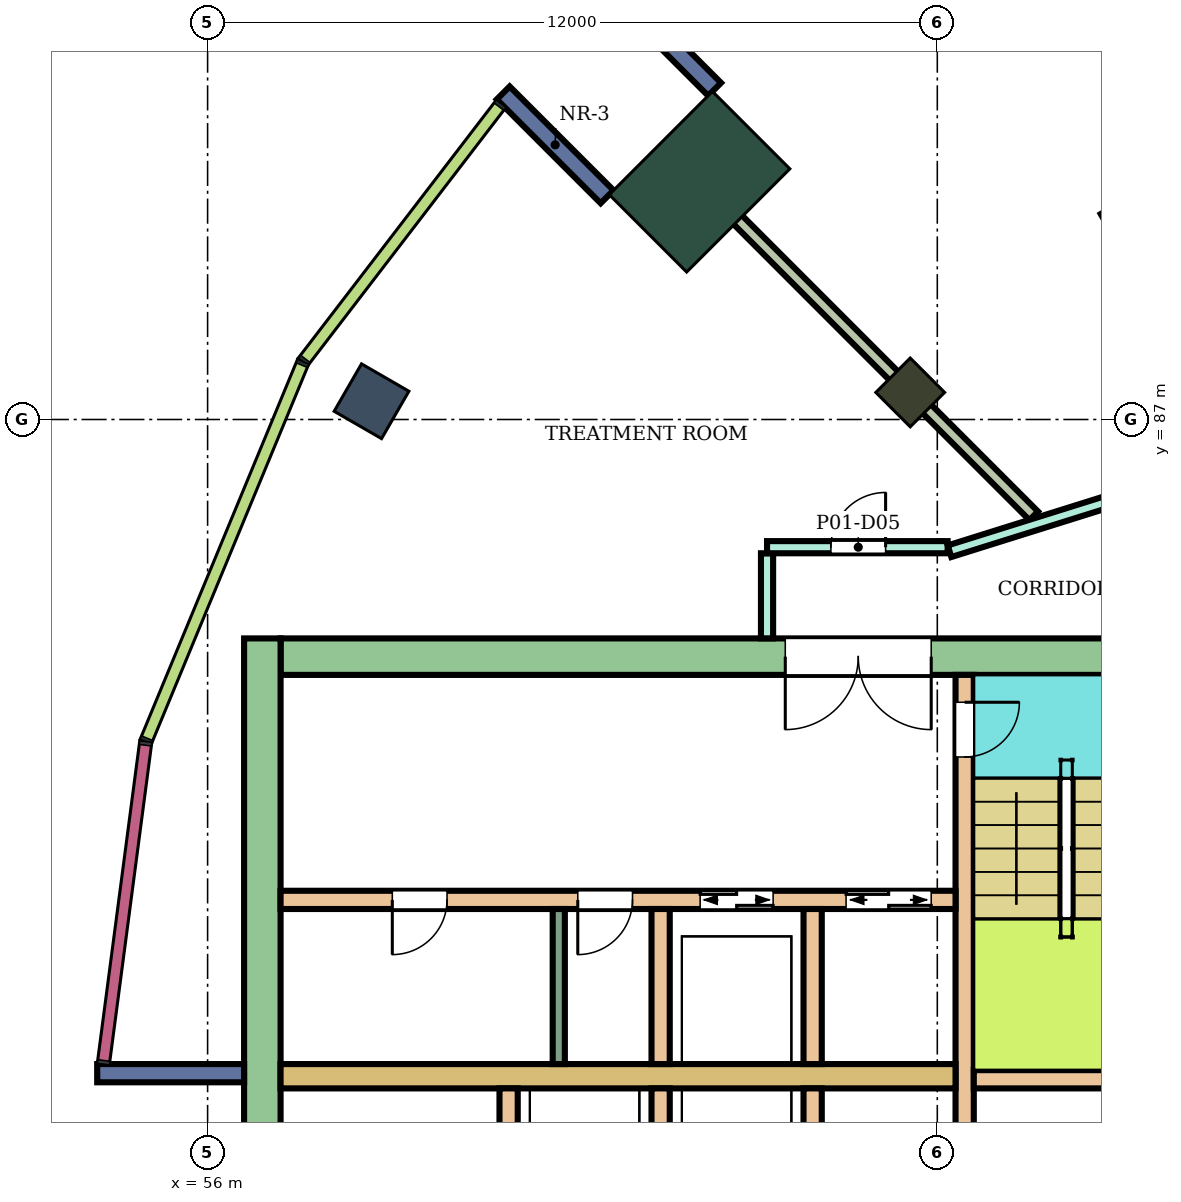
"""IFC4 building model, lengths in metres.
Left out: names, types, materials, properties, quantities, classifications, styles, units other than length and angle.
Written with IfcOpenShell. Run it as: python <this file> out.ifc"""

import sys

from ifc_helpers import new_model, si_unit, direction, frame, frame_2d, origin, origin_2d, place, context, subcontext, project, spatial, rectangle, extrude, element, fill, save


model = new_model("IFC4")
c1 = context("Model", 3, precision=1e-05, world=origin(), true_north=direction((0.0, 1.0)))
c2 = subcontext(c1, "Body", "Model", "MODEL_VIEW")
j1 = project(units=[si_unit("LENGTHUNIT", "METRE"), si_unit("PLANEANGLEUNIT", "RADIAN")], contexts=[c1])
p1 = place(None, origin())
s1 = spatial("IfcSite", under=j1, at=p1, CompositionType="ELEMENT")
p2 = place(p1, origin())
s2 = spatial("IfcBuilding", under=s1, at=p2, CompositionType="ELEMENT")
p3 = place(p2, frame((0.0, 0.0, 270.9)))
s3 = spatial("IfcBuildingStorey", under=s2, at=p3, CompositionType="ELEMENT", Elevation=270.9)
p4 = place(p3, frame((58.696, 87.3, 0.0), z_axis=(0.0, 0.0, 1.0), x_axis=(-0.866025403784, 0.5, 0.0)))
e1 = element("IfcColumn", 1, at=p4, inside=s3, PredefinedType="COLUMN", context=c2, shape_type="SweptSolid", body=[
    extrude(rectangle(XDim=0.9, YDim=0.9, at=origin_2d()), origin(), (0.0, 0.0, 1.0), 4.8),
])
for number, where, z_axis, x_axis in (
    (2, (71.2, 90.242, 0.0), (0.0, 0.0, 1.0), (-0.5, 0.866, 0.0)),
    (3, (67.555, 87.445, 0.0), (0.0, 0.0, 1.0), (-0.707, 0.707, 0.0)),
):
    element("IfcColumn", number, at=place(p3, frame(where, z_axis=z_axis, x_axis=x_axis)), inside=s3, PredefinedType="COLUMN", context=c2, shape_type="SweptSolid", body=[
        extrude(rectangle(XDim=0.8, YDim=0.8, at=origin_2d()), origin(), (0.0, 0.0, 1.0), 4.8),
    ])
p5 = place(p3, frame((64.09, 90.91, 0.0), z_axis=(0.0, 0.0, 1.0), x_axis=(-0.707106781187, 0.707106781187, 0.0)))
e4 = element("IfcColumn", 4, at=p5, inside=s3, PredefinedType="COLUMN", context=c2, shape_type="SweptSolid", body=[
    extrude(rectangle(XDim=1.8, YDim=2.4, at=origin_2d()), origin(), (0.0, 0.0, 1.0), 4.8),
])
p6 = place(p3, frame((72.1, 83.1, 0.0), z_axis=(0.0, 0.0, 1.0), x_axis=(-1.0, 0.0, 0.0)))
e5 = element("IfcWall", 5, at=p6, inside=s3, PredefinedType="SHEAR", context=c2, shape_type="SweptSolid", body=[
    extrude(rectangle(XDim=14.9, YDim=0.6, at=frame_2d((7.45, 0.0))), origin(), (0.0, 0.0, 1.0), 4.48),
])
p7 = place(p6, frame((4.2, 0.0, 0.0)))
e6 = element("IfcOpeningElement", 6, at=p7, cuts=e5, PredefinedType="OPENING", context=c2, shape_type="SweptSolid", body=[
    extrude(rectangle(XDim=2.4, YDim=2.4, at=frame_2d((1.2, 1.2))), frame((0.0, 0.31, 0.0), z_axis=(0.0, -1.0, 0.0), x_axis=(1.0, 0.0, 0.0)), (0.0, 0.0, 1.0), 0.62),
])
p8 = place(p3, frame((56.9, 83.4, 0.0), z_axis=(0.0, 0.0, 1.0), x_axis=(0.0, -1.0, 0.0)))
e7 = element("IfcWall", 7, at=p8, inside=s3, PredefinedType="SHEAR", context=c2, shape_type="SweptSolid", body=[
    extrude(rectangle(XDim=16.8, YDim=0.6, at=frame_2d((8.4, 0.0))), origin(), (0.0, 0.0, 1.0), 4.48),
])
p9 = place(p3, frame((68.45, 82.8, 0.0), z_axis=(0.0, 0.0, 1.0), x_axis=(0.0, -1.0, 0.0)))
e8 = element("IfcWall", 8, at=p9, inside=s3, PredefinedType="SHEAR", context=c2, shape_type="SweptSolid", body=[
    extrude(rectangle(XDim=7.8, YDim=0.3, at=frame_2d((3.9, 0.0))), origin(), (0.0, 0.0, 1.0), 4.48),
])
p10 = place(p9, frame((0.45, 0.0, 0.0)))
e9 = element("IfcOpeningElement", 9, at=p10, cuts=e8, PredefinedType="OPENING", context=c2, shape_type="SweptSolid", body=[
    extrude(rectangle(XDim=0.9, YDim=2.1, at=frame_2d((0.45, 1.05))), frame((0.0, 0.16, 0.0), z_axis=(0.0, -1.0, 0.0), x_axis=(1.0, 0.0, 0.0)), (0.0, 0.0, 1.0), 0.32),
])
p11 = place(p3, frame((71.65, 76.15, 0.0), z_axis=(0.0, 0.0, 1.0), x_axis=(-1.0, 0.0, 0.0)))
e10 = element("IfcWall", 10, at=p11, inside=s3, PredefinedType="SHEAR", context=c2, shape_type="SweptSolid", body=[
    extrude(rectangle(XDim=3.05, YDim=0.3, at=frame_2d((1.525, 0.0))), origin(), (0.0, 0.0, 1.0), 4.48),
])
p12 = place(p3, frame((68.3, 76.2, 0.0), z_axis=(0.0, 0.0, 1.0), x_axis=(-1.0, 0.0, 0.0)))
e11 = element("IfcWall", 11, at=p12, inside=s3, PredefinedType="SHEAR", context=c2, shape_type="SweptSolid", body=[
    extrude(rectangle(XDim=11.1, YDim=0.4, at=frame_2d((5.55, 0.0))), origin(), (0.0, 0.0, 1.0), 4.48),
])
p13 = place(p3, frame((68.3, 79.1, 0.0), z_axis=(0.0, 0.0, 1.0), x_axis=(-1.0, 0.0, 0.0)))
e12 = element("IfcWall", 12, at=p13, inside=s3, PredefinedType="SHEAR", context=c2, shape_type="SweptSolid", body=[
    extrude(rectangle(XDim=11.1, YDim=0.3, at=frame_2d((5.55, 0.0))), origin(), (0.0, 0.0, 1.0), 4.48),
])
p14 = place(p13, frame((0.4, 0.0, 0.0)))
e13 = element("IfcOpeningElement", 13, at=p14, cuts=e12, PredefinedType="OPENING", context=c2, shape_type="SweptSolid", body=[
    extrude(rectangle(XDim=1.4, YDim=2.1, at=frame_2d((0.7, 1.05))), frame((0.0, 0.16, 0.0), z_axis=(0.0, -1.0, 0.0), x_axis=(1.0, 0.0, 0.0)), (0.0, 0.0, 1.0), 0.32),
])
p15 = place(p13, frame((3.0, 0.0, 0.0)))
e14 = element("IfcOpeningElement", 14, at=p15, cuts=e12, PredefinedType="OPENING", context=c2, shape_type="SweptSolid", body=[
    extrude(rectangle(XDim=1.2, YDim=2.1, at=frame_2d((0.6, 1.05))), frame((0.0, 0.16, 0.0), z_axis=(0.0, -1.0, 0.0), x_axis=(1.0, 0.0, 0.0)), (0.0, 0.0, 1.0), 0.32),
])
p16 = place(p13, frame((5.312, 0.0, 0.0)))
e15 = element("IfcOpeningElement", 15, at=p16, cuts=e12, PredefinedType="OPENING", context=c2, shape_type="SweptSolid", body=[
    extrude(rectangle(XDim=0.9, YDim=2.1, at=frame_2d((0.45, 1.05))), frame((0.0, 0.16, 0.0), z_axis=(0.0, -1.0, 0.0), x_axis=(1.0, 0.0, 0.0)), (0.0, 0.0, 1.0), 0.32),
])
p17 = place(p13, frame((8.363, 0.0, 0.0)))
e16 = element("IfcOpeningElement", 16, at=p17, cuts=e12, PredefinedType="OPENING", context=c2, shape_type="SweptSolid", body=[
    extrude(rectangle(XDim=0.9, YDim=2.1, at=frame_2d((0.45, 1.05))), frame((0.0, 0.16, 0.0), z_axis=(0.0, -1.0, 0.0), x_axis=(1.0, 0.0, 0.0)), (0.0, 0.0, 1.0), 0.32),
])
for number, where, z_axis, x_axis in (
    (17, (65.95, 76.0, 0.0), (0.0, 0.0, 1.0), (0.0, -1.0, 0.0)),
    (18, (63.45, 76.0, 0.0), (0.0, 0.0, 1.0), (0.0, -1.0, 0.0)),
    (19, (60.95, 76.0, 0.0), (0.0, 0.0, 1.0), (0.0, -1.0, 0.0)),
    (20, (65.95, 78.95, 0.0), (0.0, 0.0, 1.0), (0.0, -1.0, 0.0)),
    (21, (63.45, 78.95, 0.0), (0.0, 0.0, 1.0), (0.0, -1.0, 0.0)),
):
    element("IfcWall", number, at=place(p3, frame(where, z_axis=z_axis, x_axis=x_axis)), inside=s3, PredefinedType="SHEAR", context=c2, shape_type="SweptSolid", body=[
        extrude(rectangle(XDim=2.55, YDim=0.3, at=frame_2d((1.275, 0.0))), origin(), (0.0, 0.0, 1.0), 4.48),
    ])
for number, where, z_axis, x_axis in (
    (22, (64.338, 92.43, 0.0), (0.0, 0.0, 1.0), (-0.707, 0.707, 0.0)),
    (23, (62.57, 90.662, 0.0), (0.0, 0.0, 1.0), (-0.707, 0.707, 0.0)),
    (24, (56.6, 76.25, 0.0), (0.0, 0.0, 1.0), (-1.0, 0.0, 0.0)),
):
    element("IfcWall", number, at=place(p3, frame(where, z_axis=z_axis, x_axis=x_axis)), inside=s3, PredefinedType="NOTDEFINED", context=c2, shape_type="SweptSolid", body=[
        extrude(rectangle(XDim=2.416, YDim=0.3, at=frame_2d((1.208, 0.0))), origin(), (0.0, 0.0, 1.0), 4.8),
    ])
p18 = place(p3, frame((63.597, 91.406, 0.0), z_axis=(0.0, 0.0, 1.0), x_axis=(0.707034710536, -0.707178844492, 0.0)))
e25 = element("IfcWall", 25, at=p18, inside=s3, PredefinedType="PARTITIONING", context=c2, shape_type="SweptSolid", body=[
    extrude(rectangle(XDim=8.469, YDim=0.2, at=frame_2d((4.235, 0.0))), origin(), (0.0, 0.0, 1.0), 3.08),
])
p19 = place(p3, frame((65.2, 83.401, 0.0), z_axis=(0.0, 0.0, 1.0), x_axis=(0.0, 1.0, 0.0)))
e26 = element("IfcWall", 26, at=p19, inside=s3, PredefinedType="PARTITIONING", context=c2, shape_type="SweptSolid", body=[
    extrude(rectangle(XDim=1.399, YDim=0.2, at=frame_2d((0.7, 0.0))), origin(), (0.0, 0.0, 1.0), 4.35),
])
p20 = place(p3, frame((65.2, 84.9, 0.0), z_axis=(0.0, 0.0, 1.0), x_axis=(1.0, 0.0, 0.0)))
e27 = element("IfcWall", 27, at=p20, inside=s3, PredefinedType="PARTITIONING", context=c2, shape_type="SweptSolid", body=[
    extrude(rectangle(XDim=2.97, YDim=0.2, at=frame_2d((1.485, 0.0))), origin(), (0.0, 0.0, 1.0), 4.35),
])
p21 = place(p20, frame((1.05, 0.0, 0.0)))
e28 = element("IfcOpeningElement", 28, at=p21, cuts=e27, PredefinedType="OPENING", context=c2, shape_type="SweptSolid", body=[
    extrude(rectangle(XDim=0.9, YDim=2.1, at=frame_2d((0.45, 1.05))), frame((0.0, 0.11, 0.0), z_axis=(0.0, -1.0, 0.0), x_axis=(1.0, 0.0, 0.0)), (0.0, 0.0, 1.0), 0.22),
])
p22 = place(p3, frame((68.201, 84.833, 0.0), z_axis=(0.0, 0.0, 1.0), x_axis=(0.95420102455, 0.299166182492, 0.0)))
e29 = element("IfcWall", 29, at=p22, inside=s3, PredefinedType="PARTITIONING", context=c2, shape_type="SweptSolid", body=[
    extrude(rectangle(XDim=5.74, YDim=0.2, at=frame_2d((2.87, 0.0))), origin(), (0.0, 0.0, 1.0), 4.35),
])
p23 = place(p22, frame((3.198, 0.0, 0.0)))
e30 = element("IfcOpeningElement", 30, at=p23, cuts=e29, PredefinedType="OPENING", context=c2, shape_type="SweptSolid", body=[
    extrude(rectangle(XDim=0.9, YDim=2.1, at=frame_2d((0.45, 1.05))), frame((0.0, 0.11, 0.0), z_axis=(0.0, -1.0, 0.0), x_axis=(1.0, 0.0, 0.0)), (0.0, 0.0, 1.0), 0.22),
])
p24 = place(p3, frame((61.775, 78.95, 0.0), z_axis=(0.0, 0.0, 1.0), x_axis=(0.0, -1.0, 0.0)))
e31 = element("IfcWall", 31, at=p24, inside=s3, PredefinedType="PARTITIONING", context=c2, shape_type="SweptSolid", body=[
    extrude(rectangle(XDim=2.55, YDim=0.2, at=frame_2d((1.275, 0.0))), origin(), (0.0, 0.0, 1.0), 4.48),
])
p25 = place(p21, origin())
e32 = element("IfcDoor", 32, at=p25, inside=s3, OperationType="SINGLE_SWING_RIGHT", PredefinedType="DOOR", context=c2, shape_type="SweptSolid", body=[
    extrude(rectangle(XDim=0.9, YDim=2.1, at=frame_2d((0.45, 1.05))), frame((0.0, 0.025, 0.0), z_axis=(0.0, -1.0, 0.0), x_axis=(1.0, 0.0, 0.0)), (0.0, 0.0, 1.0), 0.05),
])
fill(e28, e32)
p26 = place(p10, origin())
e33 = element("IfcDoor", 33, at=p26, inside=s3, OperationType="SINGLE_SWING_LEFT", PredefinedType="DOOR", context=c2, shape_type="SweptSolid", body=[
    extrude(rectangle(XDim=0.9, YDim=2.1, at=frame_2d((0.45, 1.05))), frame((0.0, 0.025, 0.0), z_axis=(0.0, -1.0, 0.0), x_axis=(1.0, 0.0, 0.0)), (0.0, 0.0, 1.0), 0.05),
])
fill(e9, e33)
p27 = place(p14, origin())
e34 = element("IfcDoor", 34, at=p27, inside=s3, OperationType="DOUBLE_DOOR_SLIDING", PredefinedType="DOOR", context=c2, shape_type="SweptSolid", body=[
    extrude(rectangle(XDim=1.4, YDim=2.1, at=frame_2d((0.7, 1.05))), frame((0.0, 0.025, 0.0), z_axis=(0.0, -1.0, 0.0), x_axis=(1.0, 0.0, 0.0)), (0.0, 0.0, 1.0), 0.05),
])
fill(e13, e34)
p28 = place(p15, origin())
e35 = element("IfcDoor", 35, at=p28, inside=s3, OperationType="DOUBLE_DOOR_SLIDING", PredefinedType="DOOR", context=c2, shape_type="SweptSolid", body=[
    extrude(rectangle(XDim=1.2, YDim=2.1, at=frame_2d((0.6, 1.05))), frame((0.0, 0.025, 0.0), z_axis=(0.0, -1.0, 0.0), x_axis=(1.0, 0.0, 0.0)), (0.0, 0.0, 1.0), 0.05),
])
fill(e14, e35)
p29 = place(p16, origin())
e36 = element("IfcDoor", 36, at=p29, inside=s3, OperationType="SINGLE_SWING_RIGHT", PredefinedType="DOOR", context=c2, shape_type="SweptSolid", body=[
    extrude(rectangle(XDim=0.9, YDim=2.1, at=frame_2d((0.45, 1.05))), frame((0.0, 0.025, 0.0), z_axis=(0.0, -1.0, 0.0), x_axis=(1.0, 0.0, 0.0)), (0.0, 0.0, 1.0), 0.05),
])
fill(e15, e36)
p30 = place(p17, origin())
e37 = element("IfcDoor", 37, at=p30, inside=s3, OperationType="SINGLE_SWING_RIGHT", PredefinedType="DOOR", context=c2, shape_type="SweptSolid", body=[
    extrude(rectangle(XDim=0.9, YDim=2.1, at=frame_2d((0.45, 1.05))), frame((0.0, 0.025, 0.0), z_axis=(0.0, -1.0, 0.0), x_axis=(1.0, 0.0, 0.0)), (0.0, 0.0, 1.0), 0.05),
])
fill(e16, e37)
p31 = place(p7, origin())
e38 = element("IfcDoor", 38, at=p31, inside=s3, OperationType="DOUBLE_DOOR_SINGLE_SWING", PredefinedType="DOOR", context=c2, shape_type="SweptSolid", body=[
    extrude(rectangle(XDim=2.4, YDim=2.4, at=frame_2d((1.2, 1.2))), frame((0.0, 0.025, 0.0), z_axis=(0.0, -1.0, 0.0), x_axis=(1.0, 0.0, 0.0)), (0.0, 0.0, 1.0), 0.05),
])
fill(e6, e38)
save(model, sys.argv[1])
